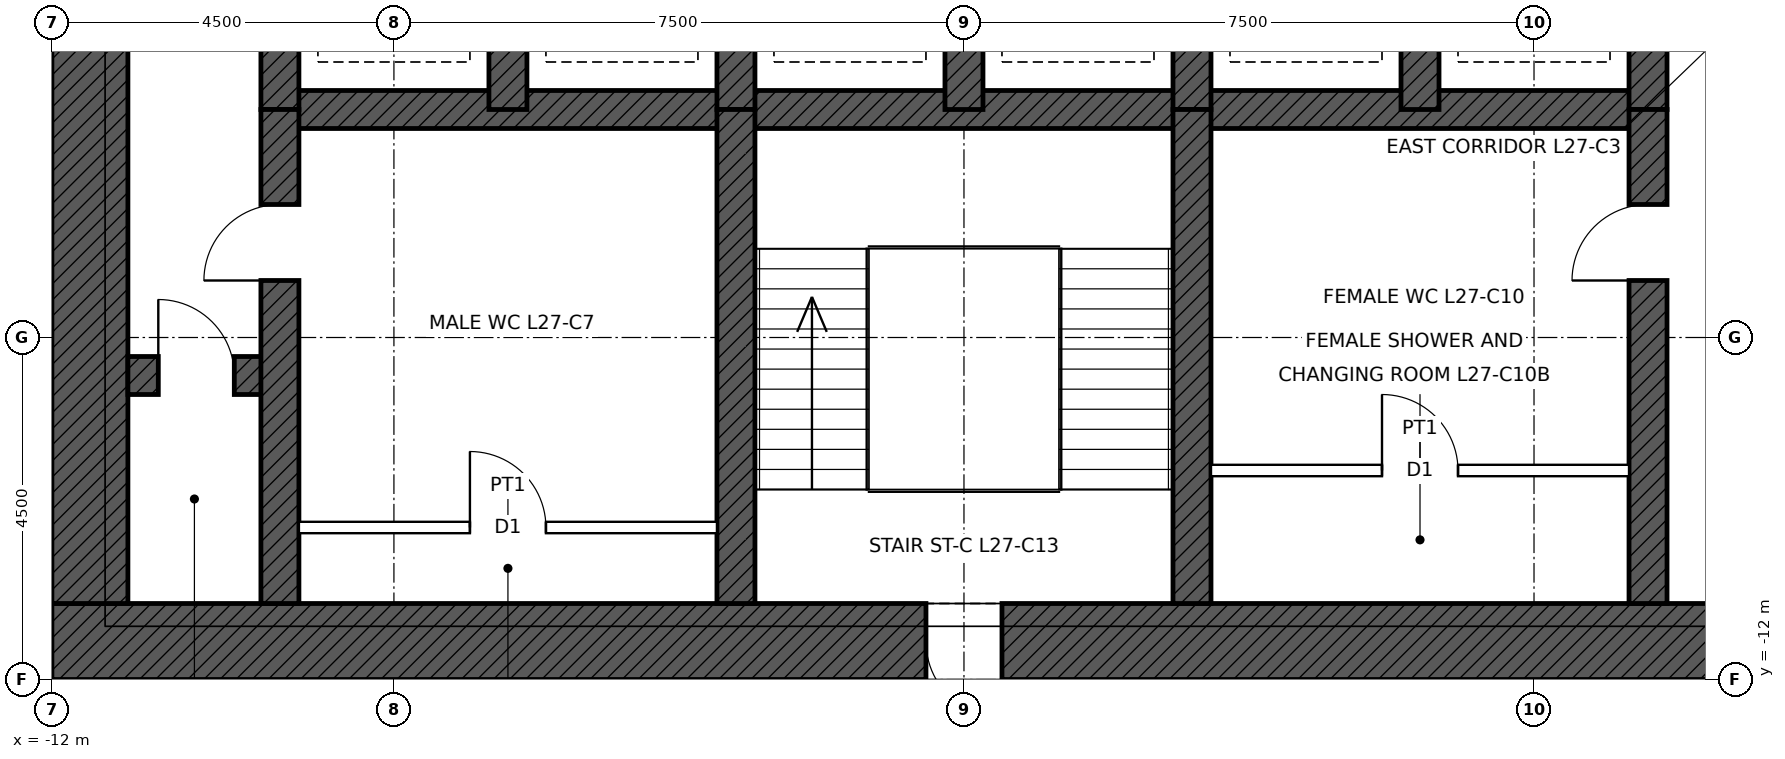
"""IFC4 building model, lengths in metres.
Left out: names, types, materials, properties, quantities, classifications, styles, units other than length and angle.
Written with IfcOpenShell. Run it as: python <this file> out.ifc"""

import sys

from ifc_helpers import new_model, si_unit, direction, frame, frame_2d, origin, place, context, subcontext, project, spatial, rectangle, extrude, element, fill, save


model = new_model("IFC4")
c1 = context("Model", 3, precision=1e-05, world=origin(), true_north=direction((0.0, 1.0)))
c2 = subcontext(c1, "Body", "Model", "MODEL_VIEW")
j1 = project(units=[si_unit("LENGTHUNIT", "METRE"), si_unit("PLANEANGLEUNIT", "RADIAN")], contexts=[c1])
p1 = place(None, origin())
s1 = spatial("IfcSite", under=j1, at=p1, CompositionType="ELEMENT")
p2 = place(p1, origin())
s2 = spatial("IfcBuilding", under=s1, at=p2, CompositionType="ELEMENT")
p3 = place(p2, frame((0.0, 0.0, 135.9)))
s3 = spatial("IfcBuildingStorey", under=s2, at=p3, CompositionType="ELEMENT", Elevation=135.9)
p4 = place(p3, frame((12.0, -11.5, 0.0), z_axis=(0.0, 0.0, 1.0), x_axis=(-1.0, 0.0, 0.0)))
e1 = element("IfcWall", 1, at=p4, inside=s3, PredefinedType="SHEAR", context=c2, shape_type="SweptSolid", body=[
    extrude(rectangle(XDim=24.0, YDim=1.0, at=frame_2d((12.0, 0.0))), origin(), (0.0, 0.0, 1.0), 4.5),
])
p5 = place(p4, frame((11.5, 0.0, 0.0)))
e2 = element("IfcOpeningElement", 2, at=p5, cuts=e1, PredefinedType="OPENING", context=c2, shape_type="SweptSolid", body=[
    extrude(rectangle(XDim=1.0, YDim=2.1, at=frame_2d((0.5, 1.05))), frame((0.0, 0.51, 0.0), z_axis=(0.0, -1.0, 0.0), x_axis=(1.0, 0.0, 0.0)), (0.0, 0.0, 1.0), 1.02),
])
p6 = place(p4, frame((1.0, 0.0, 0.0)))
e3 = element("IfcOpeningElement", 3, at=p6, cuts=e1, PredefinedType="OPENING", context=c2, shape_type="SweptSolid", body=[
    extrude(rectangle(XDim=1.0, YDim=2.4, at=frame_2d((0.5, 1.2))), frame((0.0, 0.51, 0.0), z_axis=(0.0, -1.0, 0.0), x_axis=(1.0, 0.0, 0.0)), (0.0, 0.0, 1.0), 1.02),
])
p7 = place(p3, frame((-11.5, -11.0, 0.0), z_axis=(0.0, 0.0, 1.0), x_axis=(0.0, 1.0, 0.0)))
e4 = element("IfcWall", 4, at=p7, inside=s3, PredefinedType="SHEAR", context=c2, shape_type="SweptSolid", body=[
    extrude(rectangle(XDim=22.0, YDim=1.0, at=frame_2d((11.0, 0.0))), origin(), (0.0, 0.0, 1.0), 4.5),
])
p8 = place(p7, frame((10.5, 0.0, 0.0)))
e5 = element("IfcOpeningElement", 5, at=p8, cuts=e4, PredefinedType="OPENING", context=c2, shape_type="SweptSolid", body=[
    extrude(rectangle(XDim=1.0, YDim=2.4, at=frame_2d((0.5, 1.2))), frame((0.0, 0.51, 0.0), z_axis=(0.0, -1.0, 0.0), x_axis=(1.0, 0.0, 0.0)), (0.0, 0.0, 1.0), 1.02),
])
p9 = place(p3, frame((-9.0, -4.5, 0.0), z_axis=(0.0, 0.0, 1.0), x_axis=(1.0, 0.0, 0.0)))
e6 = element("IfcWall", 6, at=p9, inside=s3, PredefinedType="SHEAR", context=c2, shape_type="SweptSolid", body=[
    extrude(rectangle(XDim=18.0, YDim=0.5, at=frame_2d((9.0, 0.0))), origin(), (0.0, 0.0, 1.0), 4.5),
])
p10 = place(p3, frame((-11.0, -8.0, 0.0), z_axis=(0.0, 0.0, 1.0), x_axis=(1.0, 0.0, 0.0)))
e7 = element("IfcWall", 7, at=p10, inside=s3, PredefinedType="SHEAR", context=c2, shape_type="SweptSolid", body=[
    extrude(rectangle(XDim=2.0, YDim=0.5, at=frame_2d((1.0, 0.0))), origin(), (0.0, 0.0, 1.0), 4.5),
])
p11 = place(p10, frame((0.4, 0.0, 0.0)))
e8 = element("IfcOpeningElement", 8, at=p11, cuts=e7, PredefinedType="OPENING", context=c2, shape_type="SweptSolid", body=[
    extrude(rectangle(XDim=1.0, YDim=2.1, at=frame_2d((0.5, 1.05))), frame((0.0, 0.26, 0.0), z_axis=(0.0, -1.0, 0.0), x_axis=(1.0, 0.0, 0.0)), (0.0, 0.0, 1.0), 0.52),
])
for number, where, z_axis, x_axis in (
    (9, (-9.0, -4.5, 0.0), (0.0, 0.0, 1.0), (0.0, 1.0, 0.0)),
    (10, (9.0, -4.5, 0.0), (0.0, 0.0, 1.0), (0.0, 1.0, 0.0)),
    (11, (-6.0, -4.5, 0.0), (0.0, 0.0, 1.0), (0.0, 1.0, 0.0)),
    (12, (-3.0, -4.5, 0.0), (0.0, 0.0, 1.0), (0.0, 1.0, 0.0)),
    (13, (0.0, -4.5, 0.0), (0.0, 0.0, 1.0), (0.0, 1.0, 0.0)),
    (14, (3.0, -4.5, 0.0), (0.0, 0.0, 1.0), (0.0, 1.0, 0.0)),
    (15, (6.0, -4.5, 0.0), (0.0, 0.0, 1.0), (0.0, 1.0, 0.0)),
):
    element("IfcWall", number, at=place(p3, frame(where, z_axis=z_axis, x_axis=x_axis)), inside=s3, PredefinedType="SHEAR", context=c2, shape_type="SweptSolid", body=[
        extrude(rectangle(XDim=3.0, YDim=0.5, at=frame_2d((1.5, 0.0))), origin(), (0.0, 0.0, 1.0), 4.5),
    ])
p12 = place(p3, frame((-9.0, -11.0, 0.0), z_axis=(0.0, 0.0, 1.0), x_axis=(0.0, 1.0, 0.0)))
e16 = element("IfcWall", 16, at=p12, inside=s3, PredefinedType="SHEAR", context=c2, shape_type="SweptSolid", body=[
    extrude(rectangle(XDim=6.5, YDim=0.5, at=frame_2d((3.25, 0.0))), origin(), (0.0, 0.0, 1.0), 4.5),
])
p13 = place(p12, frame((4.25, 0.0, 0.0)))
e17 = element("IfcOpeningElement", 17, at=p13, cuts=e16, PredefinedType="OPENING", context=c2, shape_type="SweptSolid", body=[
    extrude(rectangle(XDim=1.0, YDim=2.1, at=frame_2d((0.5, 1.05))), frame((0.0, 0.26, 0.0), z_axis=(0.0, -1.0, 0.0), x_axis=(1.0, 0.0, 0.0)), (0.0, 0.0, 1.0), 0.52),
])
p14 = place(p3, frame((9.0, -11.0, 0.0), z_axis=(0.0, 0.0, 1.0), x_axis=(0.0, 1.0, 0.0)))
e18 = element("IfcWall", 18, at=p14, inside=s3, PredefinedType="SHEAR", context=c2, shape_type="SweptSolid", body=[
    extrude(rectangle(XDim=6.5, YDim=0.5, at=frame_2d((3.25, 0.0))), origin(), (0.0, 0.0, 1.0), 4.5),
])
p15 = place(p14, frame((4.25, 0.0, 0.0)))
e19 = element("IfcOpeningElement", 19, at=p15, cuts=e18, PredefinedType="OPENING", context=c2, shape_type="SweptSolid", body=[
    extrude(rectangle(XDim=1.0, YDim=2.1, at=frame_2d((0.5, 1.05))), frame((0.0, 0.26, 0.0), z_axis=(0.0, -1.0, 0.0), x_axis=(1.0, 0.0, 0.0)), (0.0, 0.0, 1.0), 0.52),
])
for number, where, z_axis, x_axis in (
    (20, (-3.0, -11.0, 0.0), (0.0, 0.0, 1.0), (0.0, 1.0, 0.0)),
    (21, (3.0, -11.0, 0.0), (0.0, 0.0, 1.0), (0.0, 1.0, 0.0)),
):
    element("IfcWall", number, at=place(p3, frame(where, z_axis=z_axis, x_axis=x_axis)), inside=s3, PredefinedType="SHEAR", context=c2, shape_type="SweptSolid", body=[
        extrude(rectangle(XDim=6.5, YDim=0.5, at=frame_2d((3.25, 0.0))), origin(), (0.0, 0.0, 1.0), 4.5),
    ])
p16 = place(p3, frame((-8.75, -10.0, 0.0), z_axis=(0.0, 0.0, 1.0), x_axis=(1.0, 0.0, 0.0)))
e22 = element("IfcWall", 22, at=p16, inside=s3, PredefinedType="PARTITIONING", context=c2, shape_type="SweptSolid", body=[
    extrude(rectangle(XDim=5.5, YDim=0.15, at=frame_2d((2.75, 0.0))), origin(), (0.0, 0.0, 1.0), 4.25),
])
p17 = place(p16, frame((2.25, 0.0, 0.0)))
e23 = element("IfcOpeningElement", 23, at=p17, cuts=e22, PredefinedType="OPENING", context=c2, shape_type="SweptSolid", body=[
    extrude(rectangle(XDim=1.0, YDim=2.1, at=frame_2d((0.5, 1.05))), frame((0.0, 0.085, 0.0), z_axis=(0.0, -1.0, 0.0), x_axis=(1.0, 0.0, 0.0)), (0.0, 0.0, 1.0), 0.17),
])
p18 = place(p3, frame((3.25, -9.25, 0.0), z_axis=(0.0, 0.0, 1.0), x_axis=(1.0, 0.0, 0.0)))
e24 = element("IfcWall", 24, at=p18, inside=s3, PredefinedType="PARTITIONING", context=c2, shape_type="SweptSolid", body=[
    extrude(rectangle(XDim=5.5, YDim=0.15, at=frame_2d((2.75, 0.0))), origin(), (0.0, 0.0, 1.0), 4.25),
])
p19 = place(p18, frame((2.25, 0.0, 0.0)))
e25 = element("IfcOpeningElement", 25, at=p19, cuts=e24, PredefinedType="OPENING", context=c2, shape_type="SweptSolid", body=[
    extrude(rectangle(XDim=1.0, YDim=2.1, at=frame_2d((0.5, 1.05))), frame((0.0, 0.085, 0.0), z_axis=(0.0, -1.0, 0.0), x_axis=(1.0, 0.0, 0.0)), (0.0, 0.0, 1.0), 0.17),
])
p20 = place(p5, origin())
e26 = element("IfcDoor", 26, at=p20, inside=s3, OperationType="SINGLE_SWING_LEFT", PredefinedType="DOOR", context=c2, shape_type="SweptSolid", body=[
    extrude(rectangle(XDim=1.0, YDim=2.1, at=frame_2d((0.5, 1.05))), frame((0.0, 0.485, 0.0), z_axis=(0.0, -1.0, 0.0), x_axis=(1.0, 0.0, 0.0)), (0.0, 0.0, 1.0), 0.05),
])
fill(e2, e26)
p21 = place(p13, origin())
e27 = element("IfcDoor", 27, at=p21, inside=s3, OperationType="SINGLE_SWING_LEFT", PredefinedType="DOOR", context=c2, shape_type="SweptSolid", body=[
    extrude(rectangle(XDim=1.0, YDim=2.1, at=frame_2d((0.5, 1.05))), frame((0.0, 0.025, 0.0), z_axis=(0.0, -1.0, 0.0), x_axis=(1.0, 0.0, 0.0)), (0.0, 0.0, 1.0), 0.05),
])
fill(e17, e27)
p22 = place(p15, origin())
e28 = element("IfcDoor", 28, at=p22, inside=s3, OperationType="SINGLE_SWING_LEFT", PredefinedType="DOOR", context=c2, shape_type="SweptSolid", body=[
    extrude(rectangle(XDim=1.0, YDim=2.1, at=frame_2d((0.5, 1.05))), frame((0.0, 0.025, 0.0), z_axis=(0.0, -1.0, 0.0), x_axis=(1.0, 0.0, 0.0)), (0.0, 0.0, 1.0), 0.05),
])
fill(e19, e28)
p23 = place(p11, origin())
e29 = element("IfcDoor", 29, at=p23, inside=s3, OperationType="SINGLE_SWING_LEFT", PredefinedType="DOOR", context=c2, shape_type="SweptSolid", body=[
    extrude(rectangle(XDim=1.0, YDim=2.1, at=frame_2d((0.5, 1.05))), frame((0.0, 0.025, 0.0), z_axis=(0.0, -1.0, 0.0), x_axis=(1.0, 0.0, 0.0)), (0.0, 0.0, 1.0), 0.05),
])
fill(e8, e29)
p24 = place(p17, origin())
e30 = element("IfcDoor", 30, at=p24, inside=s3, OperationType="SINGLE_SWING_LEFT", PredefinedType="DOOR", context=c2, shape_type="SweptSolid", body=[
    extrude(rectangle(XDim=1.0, YDim=2.1, at=frame_2d((0.5, 1.05))), frame((0.0, 0.025, 0.0), z_axis=(0.0, -1.0, 0.0), x_axis=(1.0, 0.0, 0.0)), (0.0, 0.0, 1.0), 0.05),
])
fill(e23, e30)
p25 = place(p19, origin())
e31 = element("IfcDoor", 31, at=p25, inside=s3, OperationType="SINGLE_SWING_LEFT", PredefinedType="DOOR", context=c2, shape_type="SweptSolid", body=[
    extrude(rectangle(XDim=1.0, YDim=2.1, at=frame_2d((0.5, 1.05))), frame((0.0, 0.025, 0.0), z_axis=(0.0, -1.0, 0.0), x_axis=(1.0, 0.0, 0.0)), (0.0, 0.0, 1.0), 0.05),
])
fill(e25, e31)
save(model, sys.argv[1])
